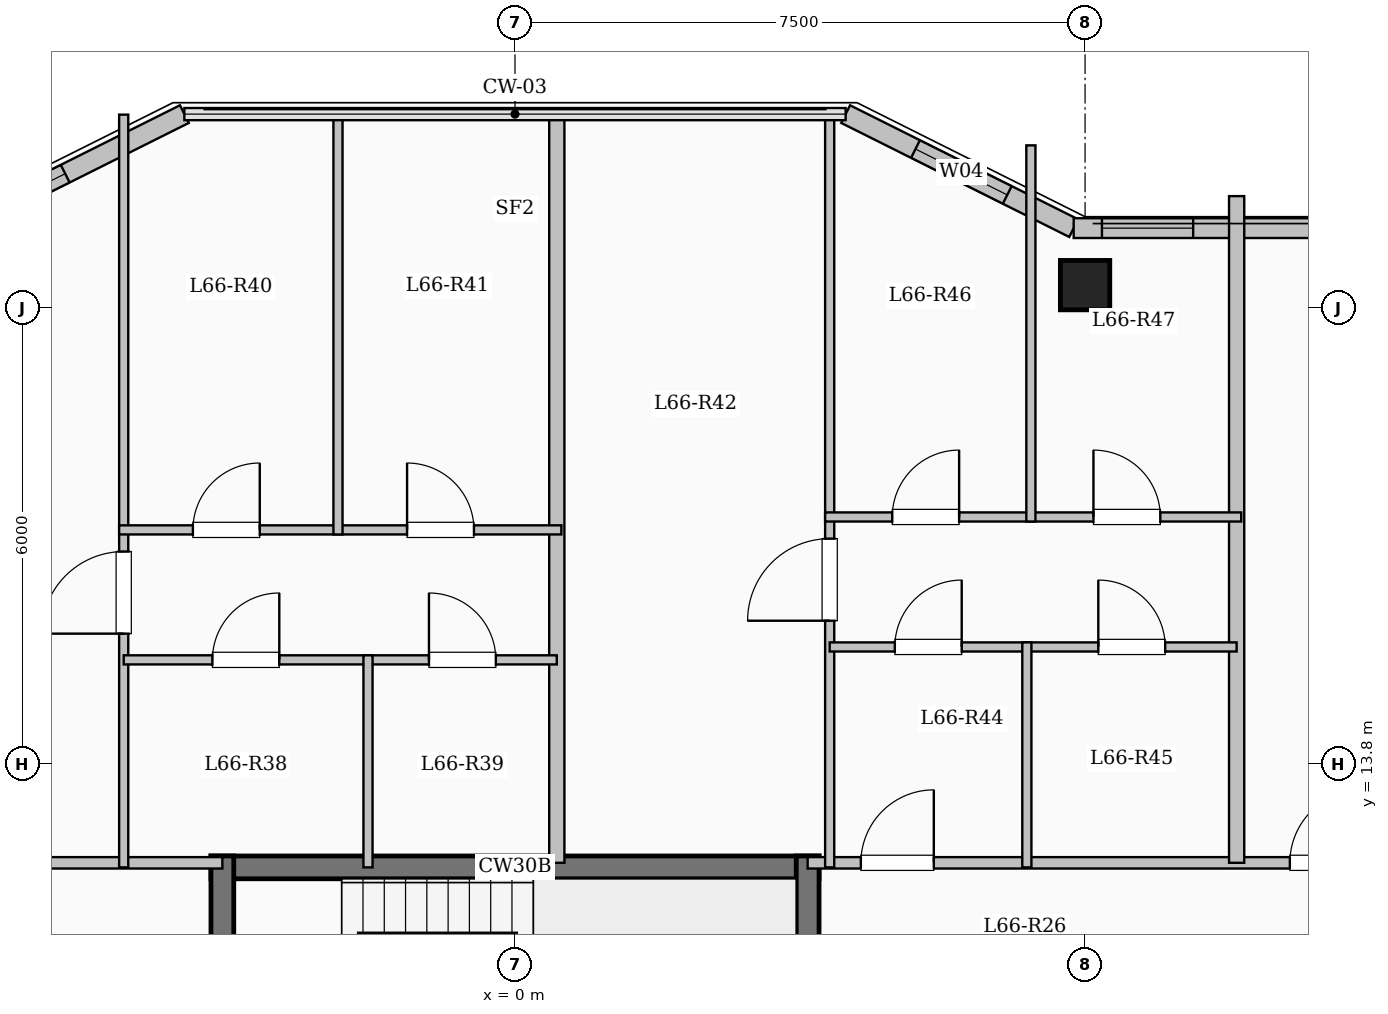
"""IFC4 building model, lengths in metres.
Left out: names, types, materials, properties, quantities, classifications, styles, units other than length and angle.
Written with IfcOpenShell. Run it as: python <this file> out.ifc"""

import sys

from ifc_helpers import new_model, si_unit, direction, frame, frame_2d, origin, origin_2d, place, context, subcontext, project, spatial, rectangle, extrude, element, fill, save


model = new_model("IFC4")
c1 = context("Model", 3, precision=1e-05, world=origin(), true_north=direction((0.0, 1.0)))
c2 = subcontext(c1, "Body", "Model", "MODEL_VIEW")
j1 = project(units=[si_unit("LENGTHUNIT", "METRE"), si_unit("PLANEANGLEUNIT", "RADIAN")], contexts=[c1])
p1 = place(None, origin())
s1 = spatial("IfcSite", under=j1, at=p1, CompositionType="ELEMENT")
p2 = place(p1, origin())
s2 = spatial("IfcBuilding", under=s1, at=p2, CompositionType="ELEMENT")
p3 = place(p2, frame((0.0, 0.0, 244.85)))
s3 = spatial("IfcBuildingStorey", under=s2, at=p3, CompositionType="ELEMENT", Elevation=244.85)
p4 = place(p3, frame((7.5, 20.1, 0.0), z_axis=(0.0, 0.0, 1.0), x_axis=(1.0, 0.0, 0.0)))
e1 = element("IfcColumn", 1, at=p4, inside=s3, PredefinedType="COLUMN", context=c2, shape_type="SweptSolid", body=[
    extrude(rectangle(XDim=0.65, YDim=0.65, at=origin_2d()), origin(), (0.0, 0.0, 1.0), 3.35),
])
p5 = place(p3, frame((-7.35, 20.85, 0.0), z_axis=(0.0, 0.0, 1.0), x_axis=(0.894427191, 0.4472135955, 0.0)))
e2 = element("IfcWall", 2, at=p5, inside=s3, PredefinedType="SOLIDWALL", context=c2, shape_type="SweptSolid", body=[
    extrude(rectangle(XDim=3.354, YDim=0.26, at=frame_2d((1.677, 0.0))), origin(), (0.0, 0.0, 1.0), 3.1),
])
p6 = place(p5, frame((0.401, 0.0, 0.95)))
e3 = element("IfcOpeningElement", 3, at=p6, cuts=e2, PredefinedType="OPENING", context=c2, shape_type="SweptSolid", body=[
    extrude(rectangle(XDim=1.2, YDim=1.5, at=frame_2d((0.6, 0.75))), frame((0.0, 0.14, 0.0), z_axis=(0.0, -1.0, 0.0), x_axis=(1.0, 0.0, 0.0)), (0.0, 0.0, 1.0), 0.28),
])
p7 = place(p3, frame((4.35, 22.35, 0.0), z_axis=(0.0, 0.0, 1.0), x_axis=(0.894427191, -0.4472135955, 0.0)))
e4 = element("IfcWall", 4, at=p7, inside=s3, PredefinedType="SOLIDWALL", context=c2, shape_type="SweptSolid", body=[
    extrude(rectangle(XDim=3.354, YDim=0.26, at=frame_2d((1.677, 0.0))), origin(), (0.0, 0.0, 1.0), 3.1),
])
p8 = place(p7, frame((1.027, 0.0, 0.95)))
e5 = element("IfcOpeningElement", 5, at=p8, cuts=e4, PredefinedType="OPENING", context=c2, shape_type="SweptSolid", body=[
    extrude(rectangle(XDim=1.35, YDim=1.55, at=frame_2d((0.675, 0.775))), frame((0.0, 0.14, 0.0), z_axis=(0.0, -1.0, 0.0), x_axis=(1.0, 0.0, 0.0)), (0.0, 0.0, 1.0), 0.28),
])
p9 = place(p3, frame((7.35, 20.85, 0.0), z_axis=(0.0, 0.0, 1.0), x_axis=(1.0, 0.0, 0.0)))
e6 = element("IfcWall", 6, at=p9, inside=s3, PredefinedType="SOLIDWALL", context=c2, shape_type="SweptSolid", body=[
    extrude(rectangle(XDim=10.5, YDim=0.26, at=frame_2d((5.25, 0.0))), origin(), (0.0, 0.0, 1.0), 3.1),
])
p10 = place(p9, frame((0.372, 0.0, 0.95)))
e7 = element("IfcOpeningElement", 7, at=p10, cuts=e6, PredefinedType="OPENING", context=c2, shape_type="SweptSolid", body=[
    extrude(rectangle(XDim=1.2, YDim=1.5, at=frame_2d((0.6, 0.75))), frame((0.0, 0.14, 0.0), z_axis=(0.0, -1.0, 0.0), x_axis=(1.0, 0.0, 0.0)), (0.0, 0.0, 1.0), 0.28),
])
p11 = place(p9, frame((3.1, 0.0, 0.9)))
e8 = element("IfcOpeningElement", 8, at=p11, cuts=e6, PredefinedType="OPENING", context=c2, shape_type="SweptSolid", body=[
    extrude(rectangle(XDim=2.2, YDim=1.75, at=frame_2d((1.1, 0.875))), frame((0.0, 0.14, 0.0), z_axis=(0.0, -1.0, 0.0), x_axis=(1.0, 0.0, 0.0)), (0.0, 0.0, 1.0), 0.28),
])
p12 = place(p9, frame((7.525, 0.0, 0.9)))
e9 = element("IfcOpeningElement", 9, at=p12, cuts=e6, PredefinedType="OPENING", context=c2, shape_type="SweptSolid", body=[
    extrude(rectangle(XDim=1.65, YDim=1.6, at=frame_2d((0.825, 0.8))), frame((0.0, 0.14, 0.0), z_axis=(0.0, -1.0, 0.0), x_axis=(1.0, 0.0, 0.0)), (0.0, 0.0, 1.0), 0.28),
])
p13 = place(p3, frame((-4.0, 12.44, 0.0), z_axis=(0.0, 0.0, 1.0), x_axis=(1.0, 0.0, 0.0)))
e10 = element("IfcWall", 10, at=p13, inside=s3, PredefinedType="SHEAR", context=c2, shape_type="SweptSolid", body=[
    extrude(rectangle(XDim=8.0, YDim=0.3, at=frame_2d((4.0, 0.0))), origin(), (0.0, 0.0, 1.0), 3.35),
])
for number, where, z_axis, x_axis in (
    (11, (-3.85, 9.0, 0.0), (0.0, 0.0, 1.0), (0.0, 1.0, 0.0)),
    (12, (3.85, 9.0, 0.0), (0.0, 0.0, 1.0), (0.0, 1.0, 0.0)),
):
    element("IfcWall", number, at=place(p3, frame(where, z_axis=z_axis, x_axis=x_axis)), inside=s3, PredefinedType="SHEAR", context=c2, shape_type="SweptSolid", body=[
        extrude(rectangle(XDim=3.59, YDim=0.3, at=frame_2d((1.795, 0.0))), origin(), (0.0, 0.0, 1.0), 3.35),
    ])
p14 = place(p3, frame((-17.75, 12.5, 0.0), z_axis=(0.0, 0.0, 1.0), x_axis=(1.0, 0.0, 0.0)))
e13 = element("IfcWall", 13, at=p14, inside=s3, PredefinedType="PARTITIONING", context=c2, shape_type="SweptSolid", body=[
    extrude(rectangle(XDim=13.9, YDim=0.15, at=frame_2d((6.95, 0.0))), origin(), (0.0, 0.0, 1.0), 3.1),
])
p15 = place(p14, frame((0.7, 0.0, 0.0)))
e14 = element("IfcOpeningElement", 14, at=p15, cuts=e13, PredefinedType="OPENING", context=c2, shape_type="SweptSolid", body=[
    extrude(rectangle(XDim=0.96, YDim=2.15, at=frame_2d((0.48, 1.075))), frame((0.0, 0.085, 0.0), z_axis=(0.0, -1.0, 0.0), x_axis=(1.0, 0.0, 0.0)), (0.0, 0.0, 1.0), 0.17),
])
p16 = place(p14, frame((9.484, 0.0, 0.0)))
e15 = element("IfcOpeningElement", 15, at=p16, cuts=e13, PredefinedType="OPENING", context=c2, shape_type="SweptSolid", body=[
    extrude(rectangle(XDim=0.96, YDim=2.15, at=frame_2d((0.48, 1.075))), frame((0.0, 0.085, 0.0), z_axis=(0.0, -1.0, 0.0), x_axis=(1.0, 0.0, 0.0)), (0.0, 0.0, 1.0), 0.17),
])
p17 = place(p3, frame((3.85, 12.5, 0.0), z_axis=(0.0, 0.0, 1.0), x_axis=(1.0, 0.0, 0.0)))
e16 = element("IfcWall", 16, at=p17, inside=s3, PredefinedType="PARTITIONING", context=c2, shape_type="SweptSolid", body=[
    extrude(rectangle(XDim=13.9, YDim=0.15, at=frame_2d((6.95, 0.0))), origin(), (0.0, 0.0, 1.0), 3.1),
])
p18 = place(p17, frame((0.7, 0.0, 0.0)))
e17 = element("IfcOpeningElement", 17, at=p18, cuts=e16, PredefinedType="OPENING", context=c2, shape_type="SweptSolid", body=[
    extrude(rectangle(XDim=0.96, YDim=2.15, at=frame_2d((0.48, 1.075))), frame((0.0, 0.085, 0.0), z_axis=(0.0, -1.0, 0.0), x_axis=(1.0, 0.0, 0.0)), (0.0, 0.0, 1.0), 0.17),
])
p19 = place(p17, frame((6.344, 0.0, 0.0)))
e18 = element("IfcOpeningElement", 18, at=p19, cuts=e16, PredefinedType="OPENING", context=c2, shape_type="SweptSolid", body=[
    extrude(rectangle(XDim=0.96, YDim=2.15, at=frame_2d((0.48, 1.075))), frame((0.0, 0.085, 0.0), z_axis=(0.0, -1.0, 0.0), x_axis=(1.0, 0.0, 0.0)), (0.0, 0.0, 1.0), 0.17),
])
p20 = place(p3, frame((0.55, 12.5, 0.0), z_axis=(0.0, 0.0, 1.0), x_axis=(0.0, 1.0, 0.0)))
e19 = element("IfcWall", 19, at=p20, inside=s3, PredefinedType="SOLIDWALL", context=c2, shape_type="SweptSolid", body=[
    extrude(rectangle(XDim=9.88, YDim=0.2, at=frame_2d((4.94, 0.0))), origin(), (0.0, 0.0, 1.0), 3.1),
])
p21 = place(p3, frame((-5.148, 12.44, 0.0), z_axis=(0.0, 0.0, 1.0), x_axis=(0.0, 1.0, 0.0)))
e20 = element("IfcWall", 20, at=p21, inside=s3, PredefinedType="PARTITIONING", context=c2, shape_type="SweptSolid", body=[
    extrude(rectangle(XDim=9.903, YDim=0.12, at=frame_2d((4.952, 0.0))), origin(), (0.0, 0.0, 1.0), 3.1),
])
p22 = place(p21, frame((3.075, 0.0, 0.0)))
e21 = element("IfcOpeningElement", 21, at=p22, cuts=e20, PredefinedType="OPENING", context=c2, shape_type="SweptSolid", body=[
    extrude(rectangle(XDim=1.08, YDim=2.15, at=frame_2d((0.54, 1.075))), frame((0.0, 0.07, 0.0), z_axis=(0.0, -1.0, 0.0), x_axis=(1.0, 0.0, 0.0)), (0.0, 0.0, 1.0), 0.14),
])
p23 = place(p3, frame((-5.148, 15.17, 0.0), z_axis=(0.0, 0.0, 1.0), x_axis=(1.0, 0.0, 0.0)))
e22 = element("IfcWall", 22, at=p23, inside=s3, PredefinedType="PARTITIONING", context=c2, shape_type="SweptSolid", body=[
    extrude(rectangle(XDim=3.214, YDim=0.12, at=frame_2d((1.607, 0.0))), origin(), (0.0, 0.0, 1.0), 3.1),
])
p24 = place(p23, frame((1.167, 0.0, 0.0)))
e23 = element("IfcOpeningElement", 23, at=p24, cuts=e22, PredefinedType="OPENING", context=c2, shape_type="SweptSolid", body=[
    extrude(rectangle(XDim=0.88, YDim=2.1, at=frame_2d((0.44, 1.05))), frame((0.0, 0.07, 0.0), z_axis=(0.0, -1.0, 0.0), x_axis=(1.0, 0.0, 0.0)), (0.0, 0.0, 1.0), 0.14),
])
p25 = place(p3, frame((-1.934, 15.17, 0.0), z_axis=(0.0, 0.0, 1.0), x_axis=(1.0, 0.0, 0.0)))
e24 = element("IfcWall", 24, at=p25, inside=s3, PredefinedType="PARTITIONING", context=c2, shape_type="SweptSolid", body=[
    extrude(rectangle(XDim=2.484, YDim=0.12, at=frame_2d((1.242, 0.0))), origin(), (0.0, 0.0, 1.0), 3.1),
])
p26 = place(p25, frame((0.802, 0.0, 0.0)))
e25 = element("IfcOpeningElement", 25, at=p26, cuts=e24, PredefinedType="OPENING", context=c2, shape_type="SweptSolid", body=[
    extrude(rectangle(XDim=0.88, YDim=2.1, at=frame_2d((0.44, 1.05))), frame((0.0, 0.07, 0.0), z_axis=(0.0, -1.0, 0.0), x_axis=(1.0, 0.0, 0.0)), (0.0, 0.0, 1.0), 0.14),
])
p27 = place(p3, frame((-5.208, 16.88, 0.0), z_axis=(0.0, 0.0, 1.0), x_axis=(1.0, 0.0, 0.0)))
e26 = element("IfcWall", 26, at=p27, inside=s3, PredefinedType="PARTITIONING", context=c2, shape_type="SweptSolid", body=[
    extrude(rectangle(XDim=5.818, YDim=0.12, at=frame_2d((2.909, 0.0))), origin(), (0.0, 0.0, 1.0), 2.785),
])
p28 = place(p27, frame((0.97, 0.0, 0.0)))
e27 = element("IfcOpeningElement", 27, at=p28, cuts=e26, PredefinedType="OPENING", context=c2, shape_type="SweptSolid", body=[
    extrude(rectangle(XDim=0.88, YDim=2.1, at=frame_2d((0.44, 1.05))), frame((0.0, 0.07, 0.0), z_axis=(0.0, -1.0, 0.0), x_axis=(1.0, 0.0, 0.0)), (0.0, 0.0, 1.0), 0.14),
])
p29 = place(p27, frame((3.788, 0.0, 0.0)))
e28 = element("IfcOpeningElement", 28, at=p29, cuts=e26, PredefinedType="OPENING", context=c2, shape_type="SweptSolid", body=[
    extrude(rectangle(XDim=0.88, YDim=2.1, at=frame_2d((0.44, 1.05))), frame((0.0, 0.07, 0.0), z_axis=(0.0, -1.0, 0.0), x_axis=(1.0, 0.0, 0.0)), (0.0, 0.0, 1.0), 0.14),
])
p30 = place(p3, frame((-1.934, 12.44, 0.0), z_axis=(0.0, 0.0, 1.0), x_axis=(0.0, 1.0, 0.0)))
e29 = element("IfcWall", 29, at=p30, inside=s3, PredefinedType="PARTITIONING", context=c2, shape_type="SweptSolid", body=[
    extrude(rectangle(XDim=2.79, YDim=0.12, at=frame_2d((1.395, 0.0))), origin(), (0.0, 0.0, 1.0), 3.1),
])
p31 = place(p3, frame((-2.329, 16.82, 0.0), z_axis=(0.0, 0.0, 1.0), x_axis=(0.0, 1.0, 0.0)))
e30 = element("IfcWall", 30, at=p31, inside=s3, PredefinedType="PARTITIONING", context=c2, shape_type="SweptSolid", body=[
    extrude(rectangle(XDim=5.56, YDim=0.12, at=frame_2d((2.78, 0.0))), origin(), (0.0, 0.0, 1.0), 3.1),
])
p32 = place(p3, frame((9.494, 12.5, 0.0), z_axis=(0.0, 0.0, 1.0), x_axis=(0.0, 1.0, 0.0)))
e31 = element("IfcWall", 31, at=p32, inside=s3, PredefinedType="SOLIDWALL", context=c2, shape_type="SweptSolid", body=[
    extrude(rectangle(XDim=8.771, YDim=0.2, at=frame_2d((4.385, 0.0))), origin(), (0.0, 0.0, 1.0), 3.1),
])
p33 = place(p3, frame((4.14, 12.44, 0.0), z_axis=(0.0, 0.0, 1.0), x_axis=(0.0, 1.0, 0.0)))
e32 = element("IfcWall", 32, at=p33, inside=s3, PredefinedType="PARTITIONING", context=c2, shape_type="SweptSolid", body=[
    extrude(rectangle(XDim=9.94, YDim=0.12, at=frame_2d((4.97, 0.0))), origin(), (0.0, 0.0, 1.0), 3.1),
])
p34 = place(p33, frame((3.245, 0.0, 0.0)))
e33 = element("IfcOpeningElement", 33, at=p34, cuts=e32, PredefinedType="OPENING", context=c2, shape_type="SweptSolid", body=[
    extrude(rectangle(XDim=1.08, YDim=2.15, at=frame_2d((0.54, 1.075))), frame((0.0, 0.07, 0.0), z_axis=(0.0, -1.0, 0.0), x_axis=(1.0, 0.0, 0.0)), (0.0, 0.0, 1.0), 0.14),
])
p35 = place(p3, frame((4.14, 15.34, 0.0), z_axis=(0.0, 0.0, 1.0), x_axis=(1.0, 0.0, 0.0)))
e34 = element("IfcWall", 34, at=p35, inside=s3, PredefinedType="PARTITIONING", context=c2, shape_type="SweptSolid", body=[
    extrude(rectangle(XDim=2.594, YDim=0.12, at=frame_2d((1.297, 0.0))), origin(), (0.0, 0.0, 1.0), 2.785),
])
p36 = place(p35, frame((0.857, 0.0, 0.0)))
e35 = element("IfcOpeningElement", 35, at=p36, cuts=e34, PredefinedType="OPENING", context=c2, shape_type="SweptSolid", body=[
    extrude(rectangle(XDim=0.88, YDim=2.1, at=frame_2d((0.44, 1.05))), frame((0.0, 0.07, 0.0), z_axis=(0.0, -1.0, 0.0), x_axis=(1.0, 0.0, 0.0)), (0.0, 0.0, 1.0), 0.14),
])
p37 = place(p3, frame((6.734, 15.34, 0.0), z_axis=(0.0, 0.0, 1.0), x_axis=(1.0, 0.0, 0.0)))
e36 = element("IfcWall", 36, at=p37, inside=s3, PredefinedType="PARTITIONING", context=c2, shape_type="SweptSolid", body=[
    extrude(rectangle(XDim=2.76, YDim=0.12, at=frame_2d((1.38, 0.0))), origin(), (0.0, 0.0, 1.0), 2.785),
])
p38 = place(p37, frame((0.94, 0.0, 0.0)))
e37 = element("IfcOpeningElement", 37, at=p38, cuts=e36, PredefinedType="OPENING", context=c2, shape_type="SweptSolid", body=[
    extrude(rectangle(XDim=0.88, YDim=2.1, at=frame_2d((0.44, 1.05))), frame((0.0, 0.07, 0.0), z_axis=(0.0, -1.0, 0.0), x_axis=(1.0, 0.0, 0.0)), (0.0, 0.0, 1.0), 0.14),
])
p39 = place(p3, frame((4.08, 17.05, 0.0), z_axis=(0.0, 0.0, 1.0), x_axis=(1.0, 0.0, 0.0)))
e38 = element("IfcWall", 38, at=p39, inside=s3, PredefinedType="PARTITIONING", context=c2, shape_type="SweptSolid", body=[
    extrude(rectangle(XDim=5.474, YDim=0.12, at=frame_2d((2.737, 0.0))), origin(), (0.0, 0.0, 1.0), 2.785),
])
p40 = place(p39, frame((0.883, 0.0, 0.0)))
e39 = element("IfcOpeningElement", 39, at=p40, cuts=e38, PredefinedType="OPENING", context=c2, shape_type="SweptSolid", body=[
    extrude(rectangle(XDim=0.88, YDim=2.1, at=frame_2d((0.44, 1.05))), frame((0.0, 0.07, 0.0), z_axis=(0.0, -1.0, 0.0), x_axis=(1.0, 0.0, 0.0)), (0.0, 0.0, 1.0), 0.14),
])
p41 = place(p39, frame((3.53, 0.0, 0.0)))
e40 = element("IfcOpeningElement", 40, at=p41, cuts=e38, PredefinedType="OPENING", context=c2, shape_type="SweptSolid", body=[
    extrude(rectangle(XDim=0.88, YDim=2.1, at=frame_2d((0.44, 1.05))), frame((0.0, 0.07, 0.0), z_axis=(0.0, -1.0, 0.0), x_axis=(1.0, 0.0, 0.0)), (0.0, 0.0, 1.0), 0.14),
])
p42 = place(p3, frame((6.734, 12.44, 0.0), z_axis=(0.0, 0.0, 1.0), x_axis=(0.0, 1.0, 0.0)))
e41 = element("IfcWall", 41, at=p42, inside=s3, PredefinedType="PARTITIONING", context=c2, shape_type="SweptSolid", body=[
    extrude(rectangle(XDim=2.96, YDim=0.12, at=frame_2d((1.48, 0.0))), origin(), (0.0, 0.0, 1.0), 3.1),
])
p43 = place(p3, frame((6.787, 16.99, 0.0), z_axis=(0.0, 0.0, 1.0), x_axis=(0.0, 1.0, 0.0)))
e42 = element("IfcWall", 42, at=p43, inside=s3, PredefinedType="PARTITIONING", context=c2, shape_type="SweptSolid", body=[
    extrude(rectangle(XDim=4.949, YDim=0.12, at=frame_2d((2.475, 0.0))), origin(), (0.0, 0.0, 1.0), 3.1),
])
p44 = place(p6, origin())
e43 = element("IfcWindow", 43, at=p44, inside=s3, PartitioningType="SINGLE_PANEL", PredefinedType="WINDOW", context=c2, shape_type="SweptSolid", body=[
    extrude(rectangle(XDim=1.2, YDim=1.5, at=frame_2d((0.6, 0.75))), frame((0.0, 0.03, 0.0), z_axis=(0.0, -1.0, 0.0), x_axis=(1.0, 0.0, 0.0)), (0.0, 0.0, 1.0), 0.06),
])
fill(e3, e43)
p45 = place(p8, origin())
e44 = element("IfcWindow", 44, at=p45, inside=s3, PartitioningType="SINGLE_PANEL", PredefinedType="WINDOW", context=c2, shape_type="SweptSolid", body=[
    extrude(rectangle(XDim=1.35, YDim=1.55, at=frame_2d((0.675, 0.775))), frame((0.0, 0.03, 0.0), z_axis=(0.0, -1.0, 0.0), x_axis=(1.0, 0.0, 0.0)), (0.0, 0.0, 1.0), 0.06),
])
fill(e5, e44)
p46 = place(p10, origin())
e45 = element("IfcWindow", 45, at=p46, inside=s3, PartitioningType="SINGLE_PANEL", PredefinedType="WINDOW", context=c2, shape_type="SweptSolid", body=[
    extrude(rectangle(XDim=1.2, YDim=1.5, at=frame_2d((0.6, 0.75))), frame((0.0, 0.03, 0.0), z_axis=(0.0, -1.0, 0.0), x_axis=(1.0, 0.0, 0.0)), (0.0, 0.0, 1.0), 0.06),
])
fill(e7, e45)
p47 = place(p22, origin())
e46 = element("IfcDoor", 46, at=p47, inside=s3, OperationType="SINGLE_SWING_LEFT", PredefinedType="DOOR", context=c2, shape_type="SweptSolid", body=[
    extrude(rectangle(XDim=1.08, YDim=2.15, at=frame_2d((0.54, 1.075))), frame((0.0, 0.025, 0.0), z_axis=(0.0, -1.0, 0.0), x_axis=(1.0, 0.0, 0.0)), (0.0, 0.0, 1.0), 0.05),
])
fill(e21, e46)
p48 = place(p24, origin())
e47 = element("IfcDoor", 47, at=p48, inside=s3, OperationType="SINGLE_SWING_RIGHT", PredefinedType="DOOR", context=c2, shape_type="SweptSolid", body=[
    extrude(rectangle(XDim=0.88, YDim=2.1, at=frame_2d((0.44, 1.05))), frame((0.0, 0.025, 0.0), z_axis=(0.0, -1.0, 0.0), x_axis=(1.0, 0.0, 0.0)), (0.0, 0.0, 1.0), 0.05),
])
fill(e23, e47)
p49 = place(p26, origin())
e48 = element("IfcDoor", 48, at=p49, inside=s3, OperationType="SINGLE_SWING_LEFT", PredefinedType="DOOR", context=c2, shape_type="SweptSolid", body=[
    extrude(rectangle(XDim=0.88, YDim=2.1, at=frame_2d((0.44, 1.05))), frame((0.0, 0.025, 0.0), z_axis=(0.0, -1.0, 0.0), x_axis=(1.0, 0.0, 0.0)), (0.0, 0.0, 1.0), 0.05),
])
fill(e25, e48)
p50 = place(p28, origin())
e49 = element("IfcDoor", 49, at=p50, inside=s3, OperationType="SINGLE_SWING_RIGHT", PredefinedType="DOOR", context=c2, shape_type="SweptSolid", body=[
    extrude(rectangle(XDim=0.88, YDim=2.1, at=frame_2d((0.44, 1.05))), frame((0.0, 0.025, 0.0), z_axis=(0.0, -1.0, 0.0), x_axis=(1.0, 0.0, 0.0)), (0.0, 0.0, 1.0), 0.05),
])
fill(e27, e49)
p51 = place(p29, origin())
e50 = element("IfcDoor", 50, at=p51, inside=s3, OperationType="SINGLE_SWING_LEFT", PredefinedType="DOOR", context=c2, shape_type="SweptSolid", body=[
    extrude(rectangle(XDim=0.88, YDim=2.1, at=frame_2d((0.44, 1.05))), frame((0.0, 0.025, 0.0), z_axis=(0.0, -1.0, 0.0), x_axis=(1.0, 0.0, 0.0)), (0.0, 0.0, 1.0), 0.05),
])
fill(e28, e50)
p52 = place(p18, origin())
e51 = element("IfcDoor", 51, at=p52, inside=s3, OperationType="SINGLE_SWING_RIGHT", PredefinedType="DOOR", context=c2, shape_type="SweptSolid", body=[
    extrude(rectangle(XDim=0.96, YDim=2.15, at=frame_2d((0.48, 1.075))), frame((0.0, 0.025, 0.0), z_axis=(0.0, -1.0, 0.0), x_axis=(1.0, 0.0, 0.0)), (0.0, 0.0, 1.0), 0.05),
])
fill(e17, e51)
p53 = place(p34, origin())
e52 = element("IfcDoor", 52, at=p53, inside=s3, OperationType="SINGLE_SWING_LEFT", PredefinedType="DOOR", context=c2, shape_type="SweptSolid", body=[
    extrude(rectangle(XDim=1.08, YDim=2.15, at=frame_2d((0.54, 1.075))), frame((0.0, 0.025, 0.0), z_axis=(0.0, -1.0, 0.0), x_axis=(1.0, 0.0, 0.0)), (0.0, 0.0, 1.0), 0.05),
])
fill(e33, e52)
p54 = place(p36, origin())
e53 = element("IfcDoor", 53, at=p54, inside=s3, OperationType="SINGLE_SWING_RIGHT", PredefinedType="DOOR", context=c2, shape_type="SweptSolid", body=[
    extrude(rectangle(XDim=0.88, YDim=2.1, at=frame_2d((0.44, 1.05))), frame((0.0, 0.025, 0.0), z_axis=(0.0, -1.0, 0.0), x_axis=(1.0, 0.0, 0.0)), (0.0, 0.0, 1.0), 0.05),
])
fill(e35, e53)
p55 = place(p38, origin())
e54 = element("IfcDoor", 54, at=p55, inside=s3, OperationType="SINGLE_SWING_LEFT", PredefinedType="DOOR", context=c2, shape_type="SweptSolid", body=[
    extrude(rectangle(XDim=0.88, YDim=2.1, at=frame_2d((0.44, 1.05))), frame((0.0, 0.025, 0.0), z_axis=(0.0, -1.0, 0.0), x_axis=(1.0, 0.0, 0.0)), (0.0, 0.0, 1.0), 0.05),
])
fill(e37, e54)
p56 = place(p40, origin())
e55 = element("IfcDoor", 55, at=p56, inside=s3, OperationType="SINGLE_SWING_RIGHT", PredefinedType="DOOR", context=c2, shape_type="SweptSolid", body=[
    extrude(rectangle(XDim=0.88, YDim=2.1, at=frame_2d((0.44, 1.05))), frame((0.0, 0.025, 0.0), z_axis=(0.0, -1.0, 0.0), x_axis=(1.0, 0.0, 0.0)), (0.0, 0.0, 1.0), 0.05),
])
fill(e39, e55)
p57 = place(p41, origin())
e56 = element("IfcDoor", 56, at=p57, inside=s3, OperationType="SINGLE_SWING_LEFT", PredefinedType="DOOR", context=c2, shape_type="SweptSolid", body=[
    extrude(rectangle(XDim=0.88, YDim=2.1, at=frame_2d((0.44, 1.05))), frame((0.0, 0.025, 0.0), z_axis=(0.0, -1.0, 0.0), x_axis=(1.0, 0.0, 0.0)), (0.0, 0.0, 1.0), 0.05),
])
fill(e40, e56)
p58 = place(p19, origin())
e57 = element("IfcDoor", 57, at=p58, inside=s3, OperationType="SINGLE_SWING_RIGHT", PredefinedType="DOOR", context=c2, shape_type="SweptSolid", body=[
    extrude(rectangle(XDim=0.96, YDim=2.15, at=frame_2d((0.48, 1.075))), frame((0.0, 0.025, 0.0), z_axis=(0.0, -1.0, 0.0), x_axis=(1.0, 0.0, 0.0)), (0.0, 0.0, 1.0), 0.05),
])
fill(e18, e57)
save(model, sys.argv[1])
